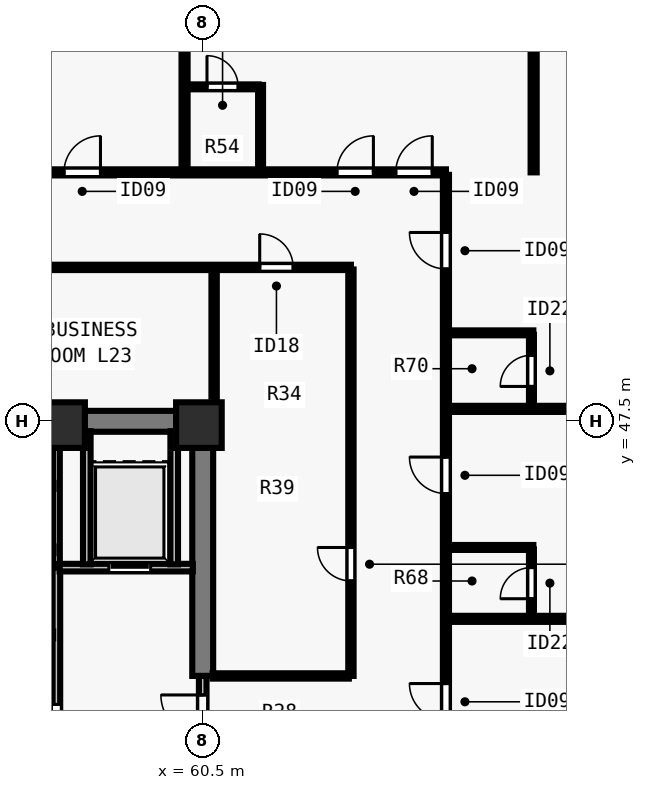
"""IFC4 building model, lengths in metres.
Left out: names, types, materials, properties, quantities, classifications, styles, units other than length and angle.
Written with IfcOpenShell. Run it as: python <this file> out.ifc"""

import sys

from ifc_helpers import new_model, si_unit, direction, frame, frame_2d, origin, origin_2d, place, context, subcontext, project, spatial, rectangle, extrude, element, fill, save


model = new_model("IFC4")
c1 = context("Model", 3, precision=1e-05, world=origin(), true_north=direction((0.0, 1.0)))
c2 = subcontext(c1, "Body", "Model", "MODEL_VIEW")
j1 = project(units=[si_unit("LENGTHUNIT", "METRE"), si_unit("PLANEANGLEUNIT", "RADIAN")], contexts=[c1])
p1 = place(None, origin())
s1 = spatial("IfcSite", under=j1, at=p1, CompositionType="ELEMENT")
p2 = place(p1, origin())
s2 = spatial("IfcBuilding", under=s1, at=p2, CompositionType="ELEMENT")
p3 = place(p2, frame((0.0, 0.0, 86.5)))
s3 = spatial("IfcBuildingStorey", under=s2, at=p3, CompositionType="ELEMENT", Elevation=86.5)
for number, where, z_axis, x_axis in (
    (1, (56.8, 47.4, 0.0), (0.0, 0.0, 1.0), (1.0, 0.0, 0.0)),
    (2, (60.4, 47.4, 0.0), (0.0, 0.0, 1.0), (1.0, 0.0, 0.0)),
):
    element("IfcColumn", number, at=place(p3, frame(where, z_axis=z_axis, x_axis=x_axis)), inside=s3, PredefinedType="COLUMN", context=c2, shape_type="SweptSolid", body=[
        extrude(rectangle(XDim=1.2, YDim=1.2, at=origin_2d()), origin(), (0.0, 0.0, 1.0), 3.5),
    ])
p4 = place(p3, frame((43.225, 47.5, 0.0), z_axis=(0.0, 0.0, 1.0), x_axis=(1.0, 0.0, 0.0)))
e3 = element("IfcWall", 3, at=p4, inside=s3, PredefinedType="SHEAR", context=c2, shape_type="SweptSolid", body=[
    extrude(rectangle(XDim=17.55, YDim=0.55, at=frame_2d((8.775, 0.0))), origin(), (0.0, 0.0, 1.0), 3.28),
])
p5 = place(p3, frame((60.5, 40.8, 0.0), z_axis=(0.0, 0.0, 1.0), x_axis=(0.0, 1.0, 0.0)))
e4 = element("IfcWall", 4, at=p5, inside=s3, PredefinedType="SHEAR", context=c2, shape_type="SweptSolid", body=[
    extrude(rectangle(XDim=6.435, YDim=0.55, at=frame_2d((3.218, 0.0))), origin(), (0.0, 0.0, 1.0), 3.28),
])
p6 = place(p3, frame((53.7, 40.5, 0.0), z_axis=(0.0, 0.0, 1.0), x_axis=(1.0, 0.0, 0.0)))
e5 = element("IfcWall", 5, at=p6, inside=s3, PredefinedType="SOLIDWALL", context=c2, shape_type="SweptSolid", body=[
    extrude(rectangle(XDim=2.95, YDim=0.2, at=frame_2d((1.475, 0.0))), origin(), (0.0, 0.0, 1.0), 3.28),
])
p7 = place(p3, frame((60.5, 38.75, 0.0), z_axis=(0.0, 0.0, 1.0), x_axis=(0.0, 1.0, 0.0)))
e6 = element("IfcWall", 6, at=p7, inside=s3, PredefinedType="SOLIDWALL", context=c2, shape_type="SweptSolid", body=[
    extrude(rectangle(XDim=2.05, YDim=0.2, at=frame_2d((1.025, 0.0))), origin(), (0.0, 0.0, 1.0), 3.28),
])
p8 = place(p7, frame((0.45, 0.0, 0.0)))
e7 = element("IfcOpeningElement", 7, at=p8, cuts=e6, PredefinedType="OPENING", context=c2, shape_type="SweptSolid", body=[
    extrude(rectangle(XDim=1.1, YDim=2.15, at=frame_2d((0.55, 1.075))), frame((0.0, 0.11, 0.0), z_axis=(0.0, -1.0, 0.0), x_axis=(1.0, 0.0, 0.0)), (0.0, 0.0, 1.0), 0.22),
])
p9 = place(p3, frame((56.65, 38.785, 0.0), z_axis=(0.0, 0.0, 1.0), x_axis=(0.0, 1.0, 0.0)))
e8 = element("IfcWall", 8, at=p9, inside=s3, PredefinedType="SOLIDWALL", context=c2, shape_type="SweptSolid", body=[
    extrude(rectangle(XDim=4.865, YDim=0.2, at=frame_2d((2.433, 0.0))), origin(), (0.0, 0.0, 1.0), 3.28),
])
p10 = place(p9, frame((0.265, 0.0, 0.0)))
e9 = element("IfcOpeningElement", 9, at=p10, cuts=e8, PredefinedType="OPENING", context=c2, shape_type="SweptSolid", body=[
    extrude(rectangle(XDim=1.0, YDim=2.15, at=frame_2d((0.5, 1.075))), frame((0.0, 0.11, 0.0), z_axis=(0.0, -1.0, 0.0), x_axis=(1.0, 0.0, 0.0)), (0.0, 0.0, 1.0), 0.22),
])
p11 = place(p3, frame((56.735, 43.65, 0.0), z_axis=(0.0, 0.0, 1.0), x_axis=(1.0, 0.0, 0.0)))
e10 = element("IfcWall", 10, at=p11, inside=s3, PredefinedType="SOLIDWALL", context=c2, shape_type="SweptSolid", body=[
    extrude(rectangle(XDim=3.505, YDim=0.2, at=frame_2d((1.752, 0.0))), origin(), (0.0, 0.0, 1.0), 3.28),
])
p12 = place(p11, frame((1.295, 0.0, 0.0)))
e11 = element("IfcOpeningElement", 11, at=p12, cuts=e10, PredefinedType="OPENING", context=c2, shape_type="SweptSolid", body=[
    extrude(rectangle(XDim=1.1, YDim=2.2, at=frame_2d((0.55, 1.1))), frame((0.0, 0.11, 0.0), z_axis=(0.0, -1.0, 0.0), x_axis=(1.0, 0.0, 0.0)), (0.0, 0.0, 1.0), 0.22),
])
for number, where, z_axis, x_axis in (
    (12, (57.45, 43.735, 0.0), (0.0, 0.0, 1.0), (0.0, 1.0, 0.0)),
    (13, (59.75, 43.735, 0.0), (0.0, 0.0, 1.0), (0.0, 1.0, 0.0)),
):
    element("IfcWall", number, at=place(p3, frame(where, z_axis=z_axis, x_axis=x_axis)), inside=s3, PredefinedType="SOLIDWALL", context=c2, shape_type="SweptSolid", body=[
        extrude(rectangle(XDim=3.505, YDim=0.2, at=frame_2d((1.752, 0.0))), origin(), (0.0, 0.0, 1.0), 3.28),
    ])
p13 = place(p3, frame((56.65, 43.735, 0.0), z_axis=(0.0, 0.0, 1.0), x_axis=(0.0, 1.0, 0.0)))
e14 = element("IfcWall", 14, at=p13, inside=s3, PredefinedType="SOLIDWALL", context=c2, shape_type="SweptSolid", body=[
    extrude(rectangle(XDim=3.505, YDim=0.18, at=frame_2d((1.752, 0.0))), origin(), (0.0, 0.0, 1.0), 3.28),
])
p14 = place(p3, frame((53.785, 41.88, 0.0), z_axis=(0.0, 0.0, 1.0), x_axis=(1.0, 0.0, 0.0)))
e15 = element("IfcWall", 15, at=p14, inside=s3, PredefinedType="SOLIDWALL", context=c2, shape_type="SweptSolid", body=[
    extrude(rectangle(XDim=2.78, YDim=0.18, at=frame_2d((1.39, 0.0))), origin(), (0.0, 0.0, 1.0), 3.28),
])
p15 = place(p3, frame((53.785, 44.12, 0.0), z_axis=(0.0, 0.0, 1.0), x_axis=(1.0, 0.0, 0.0)))
e16 = element("IfcWall", 16, at=p15, inside=s3, PredefinedType="SOLIDWALL", context=c2, shape_type="SweptSolid", body=[
    extrude(rectangle(XDim=2.79, YDim=0.18, at=frame_2d((1.395, 0.0))), origin(), (0.0, 0.0, 1.0), 3.28),
])
p16 = place(p3, frame((53.785, 45.8, 0.0), z_axis=(0.0, 0.0, 1.0), x_axis=(1.0, 0.0, 0.0)))
e17 = element("IfcWall", 17, at=p16, inside=s3, PredefinedType="PARTITIONING", context=c2, shape_type="SweptSolid", body=[
    extrude(rectangle(XDim=2.79, YDim=0.16, at=frame_2d((1.395, 0.0))), origin(), (0.0, 0.0, 1.0), 3.28),
])
p17 = place(p3, frame((37.1, 54.05, 0.0), z_axis=(0.0, 0.0, 1.0), x_axis=(1.0, 0.0, 0.0)))
e18 = element("IfcWall", 18, at=p17, inside=s3, PredefinedType="PARTITIONING", context=c2, shape_type="SweptSolid", body=[
    extrude(rectangle(XDim=29.8, YDim=0.16, at=frame_2d((14.9, 0.0))), origin(), (0.0, 0.0, 1.0), 3.28),
])
p18 = place(p17, frame((0.91, 0.0, 0.0)))
e19 = element("IfcOpeningElement", 19, at=p18, cuts=e18, PredefinedType="OPENING", context=c2, shape_type="SweptSolid", body=[
    extrude(rectangle(XDim=0.96, YDim=2.15, at=frame_2d((0.48, 1.075))), frame((0.0, 0.09, 0.0), z_axis=(0.0, -1.0, 0.0), x_axis=(1.0, 0.0, 0.0)), (0.0, 0.0, 1.0), 0.18),
])
p19 = place(p17, frame((3.03, 0.0, 0.0)))
e20 = element("IfcOpeningElement", 20, at=p19, cuts=e18, PredefinedType="OPENING", context=c2, shape_type="SweptSolid", body=[
    extrude(rectangle(XDim=0.96, YDim=2.15, at=frame_2d((0.48, 1.075))), frame((0.0, 0.09, 0.0), z_axis=(0.0, -1.0, 0.0), x_axis=(1.0, 0.0, 0.0)), (0.0, 0.0, 1.0), 0.18),
])
p20 = place(p17, frame((11.39, 0.0, 0.0)))
e21 = element("IfcOpeningElement", 21, at=p20, cuts=e18, PredefinedType="OPENING", context=c2, shape_type="SweptSolid", body=[
    extrude(rectangle(XDim=0.96, YDim=2.15, at=frame_2d((0.48, 1.075))), frame((0.0, 0.09, 0.0), z_axis=(0.0, -1.0, 0.0), x_axis=(1.0, 0.0, 0.0)), (0.0, 0.0, 1.0), 0.18),
])
p21 = place(p17, frame((19.75, 0.0, 0.0)))
e22 = element("IfcOpeningElement", 22, at=p21, cuts=e18, PredefinedType="OPENING", context=c2, shape_type="SweptSolid", body=[
    extrude(rectangle(XDim=0.96, YDim=2.15, at=frame_2d((0.48, 1.075))), frame((0.0, 0.09, 0.0), z_axis=(0.0, -1.0, 0.0), x_axis=(1.0, 0.0, 0.0)), (0.0, 0.0, 1.0), 0.18),
])
p22 = place(p17, frame((26.931, 0.0, 0.0)))
e23 = element("IfcOpeningElement", 23, at=p22, cuts=e18, PredefinedType="OPENING", context=c2, shape_type="SweptSolid", body=[
    extrude(rectangle(XDim=0.96, YDim=2.15, at=frame_2d((0.48, 1.075))), frame((0.0, 0.09, 0.0), z_axis=(0.0, -1.0, 0.0), x_axis=(1.0, 0.0, 0.0)), (0.0, 0.0, 1.0), 0.18),
])
p23 = place(p17, frame((28.48, 0.0, 0.0)))
e24 = element("IfcOpeningElement", 24, at=p23, cuts=e18, PredefinedType="OPENING", context=c2, shape_type="SweptSolid", body=[
    extrude(rectangle(XDim=0.96, YDim=2.15, at=frame_2d((0.48, 1.075))), frame((0.0, 0.09, 0.0), z_axis=(0.0, -1.0, 0.0), x_axis=(1.0, 0.0, 0.0)), (0.0, 0.0, 1.0), 0.18),
])
p24 = place(p3, frame((66.9, 24.015, 0.0), z_axis=(0.0, 0.0, 1.0), x_axis=(0.0, 1.0, 0.0)))
e25 = element("IfcWall", 25, at=p24, inside=s3, PredefinedType="PARTITIONING", context=c2, shape_type="SweptSolid", body=[
    extrude(rectangle(XDim=29.97, YDim=0.16, at=frame_2d((14.985, 0.0))), origin(), (0.0, 0.0, 1.0), 3.28),
])
p25 = place(p24, frame((3.911, 0.0, 0.0)))
e26 = element("IfcOpeningElement", 26, at=p25, cuts=e25, PredefinedType="OPENING", context=c2, shape_type="SweptSolid", body=[
    extrude(rectangle(XDim=0.96, YDim=2.15, at=frame_2d((0.48, 1.075))), frame((0.0, 0.09, 0.0), z_axis=(0.0, -1.0, 0.0), x_axis=(1.0, 0.0, 0.0)), (0.0, 0.0, 1.0), 0.18),
])
p26 = place(p24, frame((9.544, 0.0, 0.0)))
e27 = element("IfcOpeningElement", 27, at=p26, cuts=e25, PredefinedType="OPENING", context=c2, shape_type="SweptSolid", body=[
    extrude(rectangle(XDim=0.96, YDim=2.15, at=frame_2d((0.48, 1.075))), frame((0.0, 0.09, 0.0), z_axis=(0.0, -1.0, 0.0), x_axis=(1.0, 0.0, 0.0)), (0.0, 0.0, 1.0), 0.18),
])
p27 = place(p24, frame((15.625, 0.0, 0.0)))
e28 = element("IfcOpeningElement", 28, at=p27, cuts=e25, PredefinedType="OPENING", context=c2, shape_type="SweptSolid", body=[
    extrude(rectangle(XDim=0.96, YDim=2.15, at=frame_2d((0.48, 1.075))), frame((0.0, 0.09, 0.0), z_axis=(0.0, -1.0, 0.0), x_axis=(1.0, 0.0, 0.0)), (0.0, 0.0, 1.0), 0.18),
])
p28 = place(p24, frame((21.584, 0.0, 0.0)))
e29 = element("IfcOpeningElement", 29, at=p28, cuts=e25, PredefinedType="OPENING", context=c2, shape_type="SweptSolid", body=[
    extrude(rectangle(XDim=0.96, YDim=2.15, at=frame_2d((0.48, 1.075))), frame((0.0, 0.09, 0.0), z_axis=(0.0, -1.0, 0.0), x_axis=(1.0, 0.0, 0.0)), (0.0, 0.0, 1.0), 0.18),
])
p29 = place(p24, frame((27.494, 0.0, 0.0)))
e30 = element("IfcOpeningElement", 30, at=p29, cuts=e25, PredefinedType="OPENING", context=c2, shape_type="SweptSolid", body=[
    extrude(rectangle(XDim=0.96, YDim=2.15, at=frame_2d((0.48, 1.075))), frame((0.0, 0.09, 0.0), z_axis=(0.0, -1.0, 0.0), x_axis=(1.0, 0.0, 0.0)), (0.0, 0.0, 1.0), 0.18),
])
p30 = place(p3, frame((39.6, 51.55, 0.0), z_axis=(0.0, 0.0, 1.0), x_axis=(1.0, 0.0, 0.0)))
e31 = element("IfcWall", 31, at=p30, inside=s3, PredefinedType="PARTITIONING", context=c2, shape_type="SweptSolid", body=[
    extrude(rectangle(XDim=24.8, YDim=0.14, at=frame_2d((12.4, 0.0))), origin(), (0.0, 0.0, 1.0), 3.28),
])
p31 = place(p30, frame((2.2, 0.0, 0.0)))
e32 = element("IfcOpeningElement", 32, at=p31, cuts=e31, PredefinedType="OPENING", context=c2, shape_type="SweptSolid", body=[
    extrude(rectangle(XDim=0.88, YDim=2.1, at=frame_2d((0.44, 1.05))), frame((0.0, 0.08, 0.0), z_axis=(0.0, -1.0, 0.0), x_axis=(1.0, 0.0, 0.0)), (0.0, 0.0, 1.0), 0.16),
])
p32 = place(p30, frame((12.9, 0.0, 0.0)))
e33 = element("IfcOpeningElement", 33, at=p32, cuts=e31, PredefinedType="OPENING", context=c2, shape_type="SweptSolid", body=[
    extrude(rectangle(XDim=0.88, YDim=2.1, at=frame_2d((0.44, 1.05))), frame((0.0, 0.08, 0.0), z_axis=(0.0, -1.0, 0.0), x_axis=(1.0, 0.0, 0.0)), (0.0, 0.0, 1.0), 0.16),
])
p33 = place(p30, frame((22.4, 0.0, 0.0)))
e34 = element("IfcOpeningElement", 34, at=p33, cuts=e31, PredefinedType="OPENING", context=c2, shape_type="SweptSolid", body=[
    extrude(rectangle(XDim=0.88, YDim=2.1, at=frame_2d((0.44, 1.05))), frame((0.0, 0.08, 0.0), z_axis=(0.0, -1.0, 0.0), x_axis=(1.0, 0.0, 0.0)), (0.0, 0.0, 1.0), 0.16),
])
p34 = place(p3, frame((64.4, 40.8, 0.0), z_axis=(0.0, 0.0, 1.0), x_axis=(0.0, 1.0, 0.0)))
e35 = element("IfcWall", 35, at=p34, inside=s3, PredefinedType="PARTITIONING", context=c2, shape_type="SweptSolid", body=[
    extrude(rectangle(XDim=10.695, YDim=0.14, at=frame_2d((5.348, 0.0))), origin(), (0.0, 0.0, 1.0), 3.28),
])
p35 = place(p34, frame((2.5, 0.0, 0.0)))
e36 = element("IfcOpeningElement", 36, at=p35, cuts=e35, PredefinedType="OPENING", context=c2, shape_type="SweptSolid", body=[
    extrude(rectangle(XDim=0.88, YDim=2.1, at=frame_2d((0.44, 1.05))), frame((0.0, 0.08, 0.0), z_axis=(0.0, -1.0, 0.0), x_axis=(1.0, 0.0, 0.0)), (0.0, 0.0, 1.0), 0.16),
])
p36 = place(p3, frame((60.76, 40.8, 0.0), z_axis=(0.0, 0.0, 1.0), x_axis=(1.0, 0.0, 0.0)))
e37 = element("IfcWall", 37, at=p36, inside=s3, PredefinedType="PARTITIONING", context=c2, shape_type="SweptSolid", body=[
    extrude(rectangle(XDim=3.585, YDim=0.14, at=frame_2d((1.792, 0.0))), origin(), (0.0, 0.0, 1.0), 3.28),
])
p37 = place(p3, frame((60.8, 47.76, 0.0), z_axis=(0.0, 0.0, 1.0), x_axis=(0.0, 1.0, 0.0)))
e38 = element("IfcWall", 38, at=p37, inside=s3, PredefinedType="PARTITIONING", context=c2, shape_type="SweptSolid", body=[
    extrude(rectangle(XDim=3.735, YDim=0.14, at=frame_2d((1.868, 0.0))), origin(), (0.0, 0.0, 1.0), 2.439),
])
p38 = place(p3, frame((60.022, 54.115, 0.0), z_axis=(0.0, 0.0, 1.0), x_axis=(0.0, 1.0, 0.0)))
e39 = element("IfcWall", 39, at=p38, inside=s3, PredefinedType="PARTITIONING", context=c2, shape_type="SweptSolid", body=[
    extrude(rectangle(XDim=10.115, YDim=0.16, at=frame_2d((5.058, 0.0))), origin(), (0.0, 0.0, 1.0), 3.28),
])
p39 = place(p3, frame((62.022, 54.115, 0.0), z_axis=(0.0, 0.0, 1.0), x_axis=(0.0, 1.0, 0.0)))
e40 = element("IfcWall", 40, at=p39, inside=s3, PredefinedType="PLUMBINGWALL", context=c2, shape_type="SweptSolid", body=[
    extrude(rectangle(XDim=2.235, YDim=0.13, at=frame_2d((1.118, 0.0))), origin(), (0.0, 0.0, 1.0), 3.28),
])
p40 = place(p3, frame((60.087, 56.3, 0.0), z_axis=(0.0, 0.0, 1.0), x_axis=(1.0, 0.0, 0.0)))
e41 = element("IfcWall", 41, at=p40, inside=s3, PredefinedType="PLUMBINGWALL", context=c2, shape_type="SweptSolid", body=[
    extrude(rectangle(XDim=1.885, YDim=0.13, at=frame_2d((0.942, 0.0))), origin(), (0.0, 0.0, 1.0), 3.28),
])
p41 = place(p40, frame((0.525, 0.0, 0.0)))
e42 = element("IfcOpeningElement", 42, at=p41, cuts=e41, PredefinedType="OPENING", context=c2, shape_type="SweptSolid", body=[
    extrude(rectangle(XDim=0.82, YDim=2.1, at=frame_2d((0.41, 1.05))), frame((0.0, 0.075, 0.0), z_axis=(0.0, -1.0, 0.0), x_axis=(1.0, 0.0, 0.0)), (0.0, 0.0, 1.0), 0.15),
])
p42 = place(p3, frame((69.208, 54.05, 0.0), z_axis=(0.0, 0.0, 1.0), x_axis=(0.0, 1.0, 0.0)))
e43 = element("IfcWall", 43, at=p42, inside=s3, PredefinedType="PARTITIONING", context=c2, shape_type="SweptSolid", body=[
    extrude(rectangle(XDim=10.105, YDim=0.16, at=frame_2d((5.052, 0.0))), origin(), (0.0, 0.0, 1.0), 2.439),
])
p43 = place(p3, frame((66.965, 42.302, 0.0), z_axis=(0.0, 0.0, 1.0), x_axis=(1.0, 0.0, 0.0)))
e44 = element("IfcWall", 44, at=p43, inside=s3, PredefinedType="PARTITIONING", context=c2, shape_type="SweptSolid", body=[
    extrude(rectangle(XDim=10.19, YDim=0.16, at=frame_2d((5.095, 0.0))), origin(), (0.0, 0.0, 1.0), 3.28),
])
p44 = place(p3, frame((66.965, 44.181, 0.0), z_axis=(0.0, 0.0, 1.0), x_axis=(1.0, 0.0, 0.0)))
e45 = element("IfcWall", 45, at=p44, inside=s3, PredefinedType="PLUMBINGWALL", context=c2, shape_type="SweptSolid", body=[
    extrude(rectangle(XDim=2.235, YDim=0.13, at=frame_2d((1.117, 0.0))), origin(), (0.0, 0.0, 1.0), 3.28),
])
p45 = place(p3, frame((69.15, 42.367, 0.0), z_axis=(0.0, 0.0, 1.0), x_axis=(0.0, 1.0, 0.0)))
e46 = element("IfcWall", 46, at=p45, inside=s3, PredefinedType="PLUMBINGWALL", context=c2, shape_type="SweptSolid", body=[
    extrude(rectangle(XDim=1.764, YDim=0.13, at=frame_2d((0.882, 0.0))), origin(), (0.0, 0.0, 1.0), 3.28),
])
p46 = place(p45, frame((0.464, 0.0, 0.0)))
e47 = element("IfcOpeningElement", 47, at=p46, cuts=e46, PredefinedType="OPENING", context=c2, shape_type="SweptSolid", body=[
    extrude(rectangle(XDim=0.82, YDim=2.1, at=frame_2d((0.41, 1.05))), frame((0.0, 0.075, 0.0), z_axis=(0.0, -1.0, 0.0), x_axis=(1.0, 0.0, 0.0)), (0.0, 0.0, 1.0), 0.15),
])
p47 = place(p3, frame((66.965, 47.827, 0.0), z_axis=(0.0, 0.0, 1.0), x_axis=(1.0, 0.0, 0.0)))
e48 = element("IfcWall", 48, at=p47, inside=s3, PredefinedType="PARTITIONING", context=c2, shape_type="SweptSolid", body=[
    extrude(rectangle(XDim=10.19, YDim=0.16, at=frame_2d((5.095, 0.0))), origin(), (0.0, 0.0, 1.0), 3.28),
])
p48 = place(p3, frame((66.965, 49.827, 0.0), z_axis=(0.0, 0.0, 1.0), x_axis=(1.0, 0.0, 0.0)))
e49 = element("IfcWall", 49, at=p48, inside=s3, PredefinedType="PLUMBINGWALL", context=c2, shape_type="SweptSolid", body=[
    extrude(rectangle(XDim=2.235, YDim=0.13, at=frame_2d((1.117, 0.0))), origin(), (0.0, 0.0, 1.0), 3.28),
])
p49 = place(p3, frame((69.15, 47.893, 0.0), z_axis=(0.0, 0.0, 1.0), x_axis=(0.0, 1.0, 0.0)))
e50 = element("IfcWall", 50, at=p49, inside=s3, PredefinedType="PLUMBINGWALL", context=c2, shape_type="SweptSolid", body=[
    extrude(rectangle(XDim=1.885, YDim=0.13, at=frame_2d((0.942, 0.0))), origin(), (0.0, 0.0, 1.0), 3.28),
])
p50 = place(p49, frame((0.525, 0.0, 0.0)))
e51 = element("IfcOpeningElement", 51, at=p50, cuts=e50, PredefinedType="OPENING", context=c2, shape_type="SweptSolid", body=[
    extrude(rectangle(XDim=0.82, YDim=2.1, at=frame_2d((0.41, 1.05))), frame((0.0, 0.075, 0.0), z_axis=(0.0, -1.0, 0.0), x_axis=(1.0, 0.0, 0.0)), (0.0, 0.0, 1.0), 0.15),
])
p51 = place(p8, origin())
e52 = element("IfcDoor", 52, at=p51, inside=s3, OperationType="SINGLE_SWING_RIGHT", PredefinedType="DOOR", context=c2, shape_type="SweptSolid", body=[
    extrude(rectangle(XDim=1.1, YDim=2.15, at=frame_2d((0.55, 1.075))), frame((0.0, 0.025, 0.0), z_axis=(0.0, -1.0, 0.0), x_axis=(1.0, 0.0, 0.0)), (0.0, 0.0, 1.0), 0.05),
])
fill(e7, e52)
p52 = place(p10, origin())
e53 = element("IfcDoor", 53, at=p52, inside=s3, OperationType="SINGLE_SWING_LEFT", PredefinedType="DOOR", context=c2, shape_type="SweptSolid", body=[
    extrude(rectangle(XDim=1.0, YDim=2.15, at=frame_2d((0.5, 1.075))), frame((0.0, 0.025, 0.0), z_axis=(0.0, -1.0, 0.0), x_axis=(1.0, 0.0, 0.0)), (0.0, 0.0, 1.0), 0.05),
])
fill(e9, e53)
p53 = place(p12, origin())
e54 = element("IfcDoor", 54, at=p53, inside=s3, OperationType="SLIDING_TO_LEFT", PredefinedType="DOOR", context=c2, shape_type="SweptSolid", body=[
    extrude(rectangle(XDim=1.1, YDim=2.2, at=frame_2d((0.55, 1.1))), frame((0.0, 0.025, 0.0), z_axis=(0.0, -1.0, 0.0), x_axis=(1.0, 0.0, 0.0)), (0.0, 0.0, 1.0), 0.05),
])
fill(e11, e54)
p54 = place(p33, origin())
e55 = element("IfcDoor", 55, at=p54, inside=s3, OperationType="SINGLE_SWING_LEFT", PredefinedType="DOOR", context=c2, shape_type="SweptSolid", body=[
    extrude(rectangle(XDim=0.88, YDim=2.1, at=frame_2d((0.44, 1.05))), frame((0.0, 0.025, 0.0), z_axis=(0.0, -1.0, 0.0), x_axis=(1.0, 0.0, 0.0)), (0.0, 0.0, 1.0), 0.05),
])
fill(e34, e55)
p55 = place(p35, origin())
e56 = element("IfcDoor", 56, at=p55, inside=s3, OperationType="SINGLE_SWING_RIGHT", PredefinedType="DOOR", context=c2, shape_type="SweptSolid", body=[
    extrude(rectangle(XDim=0.88, YDim=2.1, at=frame_2d((0.44, 1.05))), frame((0.0, 0.025, 0.0), z_axis=(0.0, -1.0, 0.0), x_axis=(1.0, 0.0, 0.0)), (0.0, 0.0, 1.0), 0.05),
])
fill(e36, e56)
p56 = place(p21, origin())
e57 = element("IfcDoor", 57, at=p56, inside=s3, OperationType="SINGLE_SWING_RIGHT", PredefinedType="DOOR", context=c2, shape_type="SweptSolid", body=[
    extrude(rectangle(XDim=0.96, YDim=2.15, at=frame_2d((0.48, 1.075))), frame((0.0, 0.025, 0.0), z_axis=(0.0, -1.0, 0.0), x_axis=(1.0, 0.0, 0.0)), (0.0, 0.0, 1.0), 0.05),
])
fill(e22, e57)
p57 = place(p41, origin())
e58 = element("IfcDoor", 58, at=p57, inside=s3, OperationType="SINGLE_SWING_LEFT", PredefinedType="DOOR", context=c2, shape_type="SweptSolid", body=[
    extrude(rectangle(XDim=0.82, YDim=2.1, at=frame_2d((0.41, 1.05))), frame((0.0, 0.025, 0.0), z_axis=(0.0, -1.0, 0.0), x_axis=(1.0, 0.0, 0.0)), (0.0, 0.0, 1.0), 0.05),
])
fill(e42, e58)
p58 = place(p22, origin())
e59 = element("IfcDoor", 59, at=p58, inside=s3, OperationType="SINGLE_SWING_RIGHT", PredefinedType="DOOR", context=c2, shape_type="SweptSolid", body=[
    extrude(rectangle(XDim=0.96, YDim=2.15, at=frame_2d((0.48, 1.075))), frame((0.0, 0.025, 0.0), z_axis=(0.0, -1.0, 0.0), x_axis=(1.0, 0.0, 0.0)), (0.0, 0.0, 1.0), 0.05),
])
fill(e23, e59)
p59 = place(p23, origin())
e60 = element("IfcDoor", 60, at=p59, inside=s3, OperationType="SINGLE_SWING_RIGHT", PredefinedType="DOOR", context=c2, shape_type="SweptSolid", body=[
    extrude(rectangle(XDim=0.96, YDim=2.15, at=frame_2d((0.48, 1.075))), frame((0.0, 0.025, 0.0), z_axis=(0.0, -1.0, 0.0), x_axis=(1.0, 0.0, 0.0)), (0.0, 0.0, 1.0), 0.05),
])
fill(e24, e60)
p60 = place(p27, origin())
e61 = element("IfcDoor", 61, at=p60, inside=s3, OperationType="SINGLE_SWING_RIGHT", PredefinedType="DOOR", context=c2, shape_type="SweptSolid", body=[
    extrude(rectangle(XDim=0.96, YDim=2.15, at=frame_2d((0.48, 1.075))), frame((0.0, 0.025, 0.0), z_axis=(0.0, -1.0, 0.0), x_axis=(1.0, 0.0, 0.0)), (0.0, 0.0, 1.0), 0.05),
])
fill(e28, e61)
p61 = place(p46, origin())
e62 = element("IfcDoor", 62, at=p61, inside=s3, OperationType="SINGLE_SWING_LEFT", PredefinedType="DOOR", context=c2, shape_type="SweptSolid", body=[
    extrude(rectangle(XDim=0.82, YDim=2.1, at=frame_2d((0.41, 1.05))), frame((0.0, 0.025, 0.0), z_axis=(0.0, -1.0, 0.0), x_axis=(1.0, 0.0, 0.0)), (0.0, 0.0, 1.0), 0.05),
])
fill(e47, e62)
p62 = place(p28, origin())
e63 = element("IfcDoor", 63, at=p62, inside=s3, OperationType="SINGLE_SWING_RIGHT", PredefinedType="DOOR", context=c2, shape_type="SweptSolid", body=[
    extrude(rectangle(XDim=0.96, YDim=2.15, at=frame_2d((0.48, 1.075))), frame((0.0, 0.025, 0.0), z_axis=(0.0, -1.0, 0.0), x_axis=(1.0, 0.0, 0.0)), (0.0, 0.0, 1.0), 0.05),
])
fill(e29, e63)
p63 = place(p50, origin())
e64 = element("IfcDoor", 64, at=p63, inside=s3, OperationType="SINGLE_SWING_LEFT", PredefinedType="DOOR", context=c2, shape_type="SweptSolid", body=[
    extrude(rectangle(XDim=0.82, YDim=2.1, at=frame_2d((0.41, 1.05))), frame((0.0, 0.025, 0.0), z_axis=(0.0, -1.0, 0.0), x_axis=(1.0, 0.0, 0.0)), (0.0, 0.0, 1.0), 0.05),
])
fill(e51, e64)
p64 = place(p29, origin())
e65 = element("IfcDoor", 65, at=p64, inside=s3, OperationType="SINGLE_SWING_RIGHT", PredefinedType="DOOR", context=c2, shape_type="SweptSolid", body=[
    extrude(rectangle(XDim=0.96, YDim=2.15, at=frame_2d((0.48, 1.075))), frame((0.0, 0.025, 0.0), z_axis=(0.0, -1.0, 0.0), x_axis=(1.0, 0.0, 0.0)), (0.0, 0.0, 1.0), 0.05),
])
fill(e30, e65)
save(model, sys.argv[1])
